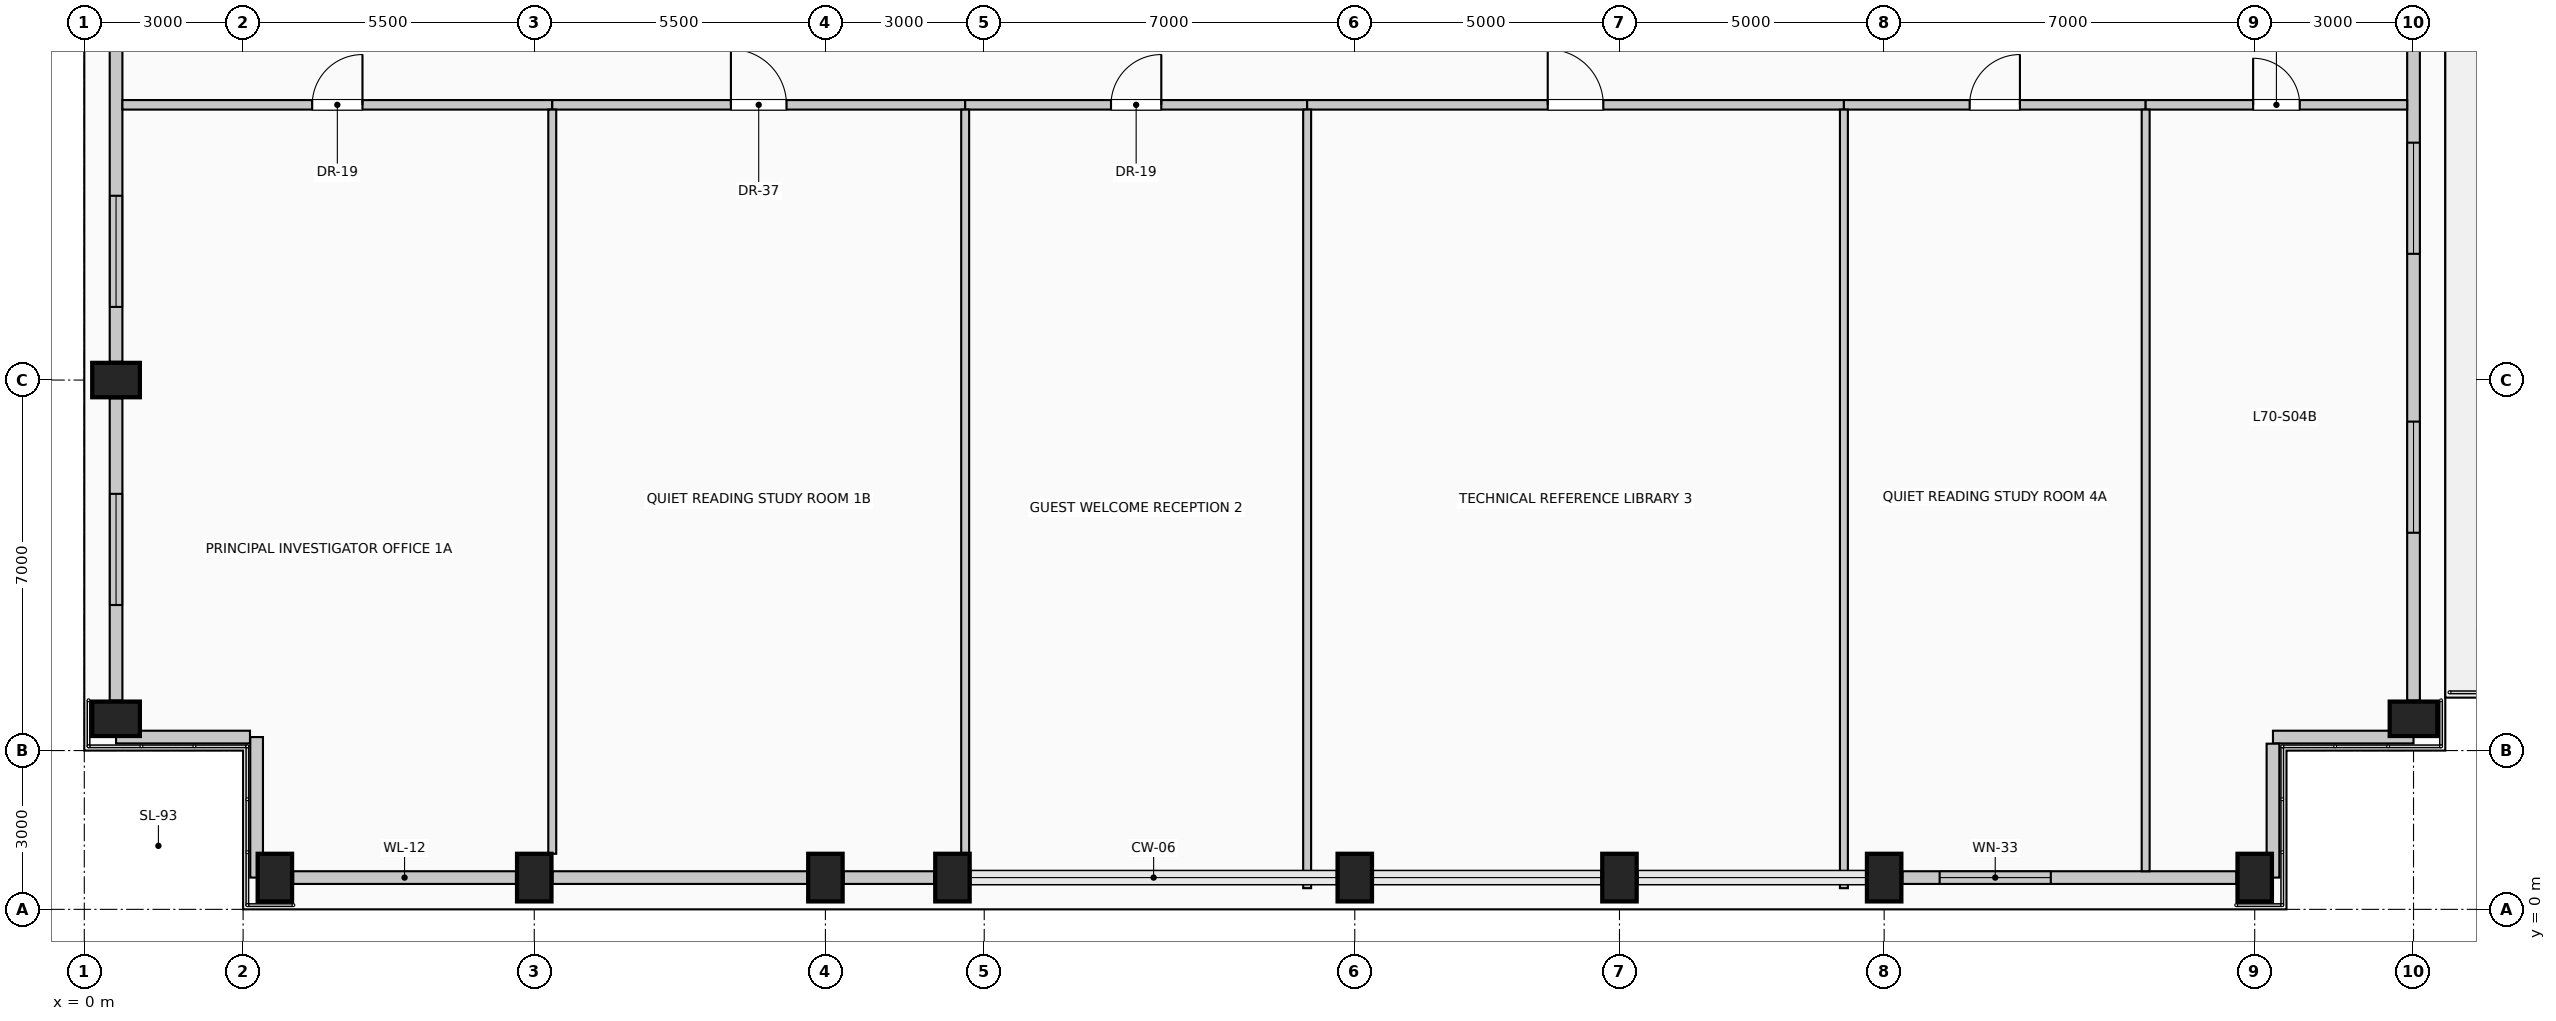
"""IFC4 building model, lengths in metres.
Left out: names, types, materials, properties, quantities, classifications, styles, units other than length and angle.
Written with IfcOpenShell. Run it as: python <this file> out.ifc"""

import sys

from ifc_helpers import new_model, si_unit, direction, frame, frame_2d, origin, origin_2d, place, context, subcontext, project, spatial, rectangle, extrude, element, fill, save


model = new_model("IFC4")
c1 = context("Model", 3, precision=1e-05, world=origin(), true_north=direction((0.0, 1.0)))
c2 = subcontext(c1, "Body", "Model", "MODEL_VIEW")
j1 = project(units=[si_unit("LENGTHUNIT", "METRE"), si_unit("PLANEANGLEUNIT", "RADIAN")], contexts=[c1])
p1 = place(None, origin())
s1 = spatial("IfcSite", under=j1, at=p1, CompositionType="ELEMENT")
p2 = place(p1, origin())
s2 = spatial("IfcBuilding", under=s1, at=p2, CompositionType="ELEMENT")
p3 = place(p2, frame((0.0, 0.0, 289.0)))
s3 = spatial("IfcBuildingStorey", under=s2, at=p3, CompositionType="ELEMENT", Elevation=289.0)
for number, where, z_axis, x_axis in (
    (1, (3.6, 0.6, 0.0), (0.0, 0.0, 1.0), (1.0, 0.0, 0.0)),
    (2, (8.5, 0.6, 0.0), (0.0, 0.0, 1.0), (1.0, 0.0, 0.0)),
    (3, (14.0, 0.6, 0.0), (0.0, 0.0, 1.0), (1.0, 0.0, 0.0)),
    (4, (16.4, 0.6, 0.0), (0.0, 0.0, 1.0), (1.0, 0.0, 0.0)),
    (5, (24.0, 0.6, 0.0), (0.0, 0.0, 1.0), (1.0, 0.0, 0.0)),
    (6, (29.0, 0.6, 0.0), (0.0, 0.0, 1.0), (1.0, 0.0, 0.0)),
    (7, (34.0, 0.6, 0.0), (0.0, 0.0, 1.0), (1.0, 0.0, 0.0)),
    (8, (41.0, 0.6, 0.0), (0.0, 0.0, 1.0), (1.0, 0.0, 0.0)),
    (9, (0.6, 3.6, 0.0), (0.0, 0.0, 1.0), (0.0, 1.0, 0.0)),
    (10, (44.0, 3.6, 0.0), (0.0, 0.0, 1.0), (0.0, 1.0, 0.0)),
    (11, (0.6, 10.0, 0.0), (0.0, 0.0, 1.0), (0.0, 1.0, 0.0)),
):
    element("IfcColumn", number, at=place(p3, frame(where, z_axis=z_axis, x_axis=x_axis)), inside=s3, PredefinedType="COLUMN", context=c2, shape_type="SweptSolid", body=[
        extrude(rectangle(XDim=0.65, YDim=0.9, at=origin_2d()), origin(), (0.0, 0.0, 1.0), 4.0),
    ])
p4 = place(p3, frame((8.155, 0.6, 0.0), z_axis=(0.0, 0.0, 1.0), x_axis=(-1.0, 0.0, 0.0)))
e12 = element("IfcWall", 12, at=p4, inside=s3, PredefinedType="SOLIDWALL", context=c2, shape_type="SweptSolid", body=[
    extrude(rectangle(XDim=4.21, YDim=0.24, at=frame_2d((2.105, 0.0))), origin(), (0.0, 0.0, 1.0), 3.025),
])
p5 = place(p3, frame((13.655, 0.6, 0.0), z_axis=(0.0, 0.0, 1.0), x_axis=(-1.0, 0.0, 0.0)))
e13 = element("IfcWall", 13, at=p5, inside=s3, PredefinedType="SOLIDWALL", context=c2, shape_type="SweptSolid", body=[
    extrude(rectangle(XDim=4.81, YDim=0.24, at=frame_2d((2.405, 0.0))), origin(), (0.0, 0.0, 1.0), 3.025),
])
p6 = place(p3, frame((16.055, 0.6, 0.0), z_axis=(0.0, 0.0, 1.0), x_axis=(-1.0, 0.0, 0.0)))
e14 = element("IfcWall", 14, at=p6, inside=s3, PredefinedType="SOLIDWALL", context=c2, shape_type="SweptSolid", body=[
    extrude(rectangle(XDim=1.71, YDim=0.24, at=frame_2d((0.855, 0.0))), origin(), (0.0, 0.0, 1.0), 3.025),
])
p7 = place(p3, frame((40.655, 0.6, 0.0), z_axis=(0.0, 0.0, 1.0), x_axis=(-1.0, 0.0, 0.0)))
e15 = element("IfcWall", 15, at=p7, inside=s3, PredefinedType="SOLIDWALL", context=c2, shape_type="SweptSolid", body=[
    extrude(rectangle(XDim=6.31, YDim=0.24, at=frame_2d((3.155, 0.0))), origin(), (0.0, 0.0, 1.0), 3.025),
])
p8 = place(p7, frame((3.507, 0.0, 0.35)))
e16 = element("IfcOpeningElement", 16, at=p8, cuts=e15, PredefinedType="OPENING", context=c2, shape_type="SweptSolid", body=[
    extrude(rectangle(XDim=2.1, YDim=2.2, at=frame_2d((1.05, 1.1))), frame((0.0, 0.13, 0.0), z_axis=(0.0, -1.0, 0.0), x_axis=(1.0, 0.0, 0.0)), (0.0, 0.0, 1.0), 0.26),
])
p9 = place(p3, frame((0.6, 3.945, 0.0), z_axis=(0.0, 0.0, 1.0), x_axis=(0.0, 1.0, 0.0)))
e17 = element("IfcWall", 17, at=p9, inside=s3, PredefinedType="SOLIDWALL", context=c2, shape_type="SweptSolid", body=[
    extrude(rectangle(XDim=5.71, YDim=0.24, at=frame_2d((2.855, 0.0))), origin(), (0.0, 0.0, 1.0), 3.025),
])
p10 = place(p9, frame((1.805, 0.0, 0.35)))
e18 = element("IfcOpeningElement", 18, at=p10, cuts=e17, PredefinedType="OPENING", context=c2, shape_type="SweptSolid", body=[
    extrude(rectangle(XDim=2.1, YDim=2.2, at=frame_2d((1.05, 1.1))), frame((0.0, 0.13, 0.0), z_axis=(0.0, -1.0, 0.0), x_axis=(1.0, 0.0, 0.0)), (0.0, 0.0, 1.0), 0.26),
])
p11 = place(p3, frame((0.6, 10.345, 0.0), z_axis=(0.0, 0.0, 1.0), x_axis=(0.0, 1.0, 0.0)))
e19 = element("IfcWall", 19, at=p11, inside=s3, PredefinedType="SOLIDWALL", context=c2, shape_type="SweptSolid", body=[
    extrude(rectangle(XDim=7.31, YDim=0.24, at=frame_2d((3.655, 0.0))), origin(), (0.0, 0.0, 1.0), 3.025),
])
p12 = place(p11, frame((1.037, 0.0, 0.35)))
e20 = element("IfcOpeningElement", 20, at=p12, cuts=e19, PredefinedType="OPENING", context=c2, shape_type="SweptSolid", body=[
    extrude(rectangle(XDim=2.1, YDim=2.2, at=frame_2d((1.05, 1.1))), frame((0.0, 0.13, 0.0), z_axis=(0.0, -1.0, 0.0), x_axis=(1.0, 0.0, 0.0)), (0.0, 0.0, 1.0), 0.26),
])
p13 = place(p3, frame((44.0, 17.655, 0.0), z_axis=(0.0, 0.0, 1.0), x_axis=(0.0, -1.0, 0.0)))
e21 = element("IfcWall", 21, at=p13, inside=s3, PredefinedType="SOLIDWALL", context=c2, shape_type="SweptSolid", body=[
    extrude(rectangle(XDim=13.71, YDim=0.24, at=frame_2d((6.855, 0.0))), origin(), (0.0, 0.0, 1.0), 3.025),
])
p14 = place(p13, frame((3.17, 0.0, 0.35)))
e22 = element("IfcOpeningElement", 22, at=p14, cuts=e21, PredefinedType="OPENING", context=c2, shape_type="SweptSolid", body=[
    extrude(rectangle(XDim=2.1, YDim=2.2, at=frame_2d((1.05, 1.1))), frame((0.0, 0.13, 0.0), z_axis=(0.0, -1.0, 0.0), x_axis=(1.0, 0.0, 0.0)), (0.0, 0.0, 1.0), 0.26),
])
p15 = place(p13, frame((8.44, 0.0, 0.35)))
e23 = element("IfcOpeningElement", 23, at=p15, cuts=e21, PredefinedType="OPENING", context=c2, shape_type="SweptSolid", body=[
    extrude(rectangle(XDim=2.1, YDim=2.2, at=frame_2d((1.05, 1.1))), frame((0.0, 0.13, 0.0), z_axis=(0.0, -1.0, 0.0), x_axis=(1.0, 0.0, 0.0)), (0.0, 0.0, 1.0), 0.26),
])
p16 = place(p3, frame((44.0, 3.255, 0.0), z_axis=(0.0, 0.0, 1.0), x_axis=(-1.0, 0.0, 0.0)))
e24 = element("IfcWall", 24, at=p16, inside=s3, PredefinedType="SOLIDWALL", context=c2, shape_type="SweptSolid", body=[
    extrude(rectangle(XDim=2.655, YDim=0.24, at=frame_2d((1.328, 0.0))), origin(), (0.0, 0.0, 1.0), 3.775),
])
p17 = place(p3, frame((41.345, 3.13, 0.0), z_axis=(0.0, 0.0, 1.0), x_axis=(0.0, -1.0, 0.0)))
e25 = element("IfcWall", 25, at=p17, inside=s3, PredefinedType="SOLIDWALL", context=c2, shape_type="SweptSolid", body=[
    extrude(rectangle(XDim=2.53, YDim=0.24, at=frame_2d((1.265, 0.0))), origin(), (0.0, 0.0, 1.0), 3.775),
])
p18 = place(p3, frame((3.255, 0.6, 0.0), z_axis=(0.0, 0.0, 1.0), x_axis=(0.0, 1.0, 0.0)))
e26 = element("IfcWall", 26, at=p18, inside=s3, PredefinedType="SOLIDWALL", context=c2, shape_type="SweptSolid", body=[
    extrude(rectangle(XDim=2.655, YDim=0.24, at=frame_2d((1.327, 0.0))), origin(), (0.0, 0.0, 1.0), 3.775),
])
p19 = place(p3, frame((3.13, 3.255, 0.0), z_axis=(0.0, 0.0, 1.0), x_axis=(-1.0, 0.0, 0.0)))
e27 = element("IfcWall", 27, at=p19, inside=s3, PredefinedType="SOLIDWALL", context=c2, shape_type="SweptSolid", body=[
    extrude(rectangle(XDim=2.53, YDim=0.24, at=frame_2d((1.265, 0.0))), origin(), (0.0, 0.0, 1.0), 3.775),
])
p20 = place(p3, frame((0.72, 15.2, 0.0), z_axis=(0.0, 0.0, 1.0), x_axis=(1.0, 0.0, 0.0)))
e28 = element("IfcWall", 28, at=p20, inside=s3, PredefinedType="PARTITIONING", context=c2, shape_type="SweptSolid", body=[
    extrude(rectangle(XDim=8.12, YDim=0.18, at=frame_2d((4.06, 0.0))), origin(), (0.0, 0.0, 1.0), 3.775),
])
p21 = place(p20, frame((3.585, 0.0, 0.0)))
e29 = element("IfcOpeningElement", 29, at=p21, cuts=e28, PredefinedType="OPENING", context=c2, shape_type="SweptSolid", body=[
    extrude(rectangle(XDim=0.95, YDim=2.15, at=frame_2d((0.475, 1.075))), frame((0.0, 0.1, 0.0), z_axis=(0.0, -1.0, 0.0), x_axis=(1.0, 0.0, 0.0)), (0.0, 0.0, 1.0), 0.2),
])
p22 = place(p3, frame((8.84, 15.2, 0.0), z_axis=(0.0, 0.0, 1.0), x_axis=(1.0, 0.0, 0.0)))
e30 = element("IfcWall", 30, at=p22, inside=s3, PredefinedType="PARTITIONING", context=c2, shape_type="SweptSolid", body=[
    extrude(rectangle(XDim=7.8, YDim=0.18, at=frame_2d((3.9, 0.0))), origin(), (0.0, 0.0, 1.0), 3.775),
])
p23 = place(p22, frame((3.375, 0.0, 0.0)))
e31 = element("IfcOpeningElement", 31, at=p23, cuts=e30, PredefinedType="OPENING", context=c2, shape_type="SweptSolid", body=[
    extrude(rectangle(XDim=1.05, YDim=2.15, at=frame_2d((0.525, 1.075))), frame((0.0, 0.1, 0.0), z_axis=(0.0, -1.0, 0.0), x_axis=(1.0, 0.0, 0.0)), (0.0, 0.0, 1.0), 0.2),
])
p24 = place(p3, frame((16.64, 15.2, 0.0), z_axis=(0.0, 0.0, 1.0), x_axis=(1.0, 0.0, 0.0)))
e32 = element("IfcWall", 32, at=p24, inside=s3, PredefinedType="PARTITIONING", context=c2, shape_type="SweptSolid", body=[
    extrude(rectangle(XDim=6.46, YDim=0.18, at=frame_2d((3.23, 0.0))), origin(), (0.0, 0.0, 1.0), 3.775),
])
p25 = place(p24, frame((2.755, 0.0, 0.0)))
e33 = element("IfcOpeningElement", 33, at=p25, cuts=e32, PredefinedType="OPENING", context=c2, shape_type="SweptSolid", body=[
    extrude(rectangle(XDim=0.95, YDim=2.15, at=frame_2d((0.475, 1.075))), frame((0.0, 0.1, 0.0), z_axis=(0.0, -1.0, 0.0), x_axis=(1.0, 0.0, 0.0)), (0.0, 0.0, 1.0), 0.2),
])
p26 = place(p3, frame((23.1, 15.2, 0.0), z_axis=(0.0, 0.0, 1.0), x_axis=(1.0, 0.0, 0.0)))
e34 = element("IfcWall", 34, at=p26, inside=s3, PredefinedType="PARTITIONING", context=c2, shape_type="SweptSolid", body=[
    extrude(rectangle(XDim=10.14, YDim=0.18, at=frame_2d((5.07, 0.0))), origin(), (0.0, 0.0, 1.0), 3.775),
])
p27 = place(p26, frame((4.545, 0.0, 0.0)))
e35 = element("IfcOpeningElement", 35, at=p27, cuts=e34, PredefinedType="OPENING", context=c2, shape_type="SweptSolid", body=[
    extrude(rectangle(XDim=1.05, YDim=2.15, at=frame_2d((0.525, 1.075))), frame((0.0, 0.1, 0.0), z_axis=(0.0, -1.0, 0.0), x_axis=(1.0, 0.0, 0.0)), (0.0, 0.0, 1.0), 0.2),
])
p28 = place(p3, frame((33.24, 15.2, 0.0), z_axis=(0.0, 0.0, 1.0), x_axis=(1.0, 0.0, 0.0)))
e36 = element("IfcWall", 36, at=p28, inside=s3, PredefinedType="PARTITIONING", context=c2, shape_type="SweptSolid", body=[
    extrude(rectangle(XDim=5.7, YDim=0.18, at=frame_2d((2.85, 0.0))), origin(), (0.0, 0.0, 1.0), 3.775),
])
p29 = place(p28, frame((2.375, 0.0, 0.0)))
e37 = element("IfcOpeningElement", 37, at=p29, cuts=e36, PredefinedType="OPENING", context=c2, shape_type="SweptSolid", body=[
    extrude(rectangle(XDim=0.95, YDim=2.15, at=frame_2d((0.475, 1.075))), frame((0.0, 0.1, 0.0), z_axis=(0.0, -1.0, 0.0), x_axis=(1.0, 0.0, 0.0)), (0.0, 0.0, 1.0), 0.2),
])
p30 = place(p3, frame((38.94, 15.2, 0.0), z_axis=(0.0, 0.0, 1.0), x_axis=(1.0, 0.0, 0.0)))
e38 = element("IfcWall", 38, at=p30, inside=s3, PredefinedType="PARTITIONING", context=c2, shape_type="SweptSolid", body=[
    extrude(rectangle(XDim=4.94, YDim=0.18, at=frame_2d((2.47, 0.0))), origin(), (0.0, 0.0, 1.0), 3.775),
])
p31 = place(p30, frame((2.03, 0.0, 0.0)))
e39 = element("IfcOpeningElement", 39, at=p31, cuts=e38, PredefinedType="OPENING", context=c2, shape_type="SweptSolid", body=[
    extrude(rectangle(XDim=0.88, YDim=2.1, at=frame_2d((0.44, 1.05))), frame((0.0, 0.1, 0.0), z_axis=(0.0, -1.0, 0.0), x_axis=(1.0, 0.0, 0.0)), (0.0, 0.0, 1.0), 0.2),
])
p32 = place(p3, frame((8.84, 1.05, 0.0), z_axis=(0.0, 0.0, 1.0), x_axis=(0.0, 1.0, 0.0)))
e40 = element("IfcWall", 40, at=p32, inside=s3, PredefinedType="PARTITIONING", context=c2, shape_type="SweptSolid", body=[
    extrude(rectangle(XDim=14.06, YDim=0.15, at=frame_2d((7.03, 0.0))), origin(), (0.0, 0.0, 1.0), 3.775),
])
p33 = place(p3, frame((16.64, 1.05, 0.0), z_axis=(0.0, 0.0, 1.0), x_axis=(0.0, 1.0, 0.0)))
e41 = element("IfcWall", 41, at=p33, inside=s3, PredefinedType="PARTITIONING", context=c2, shape_type="SweptSolid", body=[
    extrude(rectangle(XDim=14.06, YDim=0.15, at=frame_2d((7.03, 0.0))), origin(), (0.0, 0.0, 1.0), 3.27),
])
for number, where, z_axis, x_axis in (
    (42, (23.1, 0.4, 0.0), (0.0, 0.0, 1.0), (0.0, 1.0, 0.0)),
    (43, (33.24, 0.4, 0.0), (0.0, 0.0, 1.0), (0.0, 1.0, 0.0)),
):
    element("IfcWall", number, at=place(p3, frame(where, z_axis=z_axis, x_axis=x_axis)), inside=s3, PredefinedType="PARTITIONING", context=c2, shape_type="SweptSolid", body=[
        extrude(rectangle(XDim=14.71, YDim=0.15, at=frame_2d((7.355, 0.0))), origin(), (0.0, 0.0, 1.0), 3.775),
    ])
p34 = place(p3, frame((38.94, 0.72, 0.0), z_axis=(0.0, 0.0, 1.0), x_axis=(0.0, 1.0, 0.0)))
e44 = element("IfcWall", 44, at=p34, inside=s3, PredefinedType="PARTITIONING", context=c2, shape_type="SweptSolid", body=[
    extrude(rectangle(XDim=14.39, YDim=0.15, at=frame_2d((7.195, 0.0))), origin(), (0.0, 0.0, 1.0), 3.775),
])
p35 = place(p8, origin())
e45 = element("IfcWindow", 45, at=p35, inside=s3, PartitioningType="SINGLE_PANEL", PredefinedType="WINDOW", context=c2, shape_type="SweptSolid", body=[
    extrude(rectangle(XDim=2.1, YDim=2.2, at=frame_2d((1.05, 1.1))), frame((0.0, 0.03, 0.0), z_axis=(0.0, -1.0, 0.0), x_axis=(1.0, 0.0, 0.0)), (0.0, 0.0, 1.0), 0.06),
])
fill(e16, e45)
p36 = place(p10, origin())
e46 = element("IfcWindow", 46, at=p36, inside=s3, PartitioningType="SINGLE_PANEL", PredefinedType="WINDOW", context=c2, shape_type="SweptSolid", body=[
    extrude(rectangle(XDim=2.1, YDim=2.2, at=frame_2d((1.05, 1.1))), frame((0.0, 0.03, 0.0), z_axis=(0.0, -1.0, 0.0), x_axis=(1.0, 0.0, 0.0)), (0.0, 0.0, 1.0), 0.06),
])
fill(e18, e46)
p37 = place(p12, origin())
e47 = element("IfcWindow", 47, at=p37, inside=s3, PartitioningType="SINGLE_PANEL", PredefinedType="WINDOW", context=c2, shape_type="SweptSolid", body=[
    extrude(rectangle(XDim=2.1, YDim=2.2, at=frame_2d((1.05, 1.1))), frame((0.0, 0.03, 0.0), z_axis=(0.0, -1.0, 0.0), x_axis=(1.0, 0.0, 0.0)), (0.0, 0.0, 1.0), 0.06),
])
fill(e20, e47)
p38 = place(p14, origin())
e48 = element("IfcWindow", 48, at=p38, inside=s3, PartitioningType="SINGLE_PANEL", PredefinedType="WINDOW", context=c2, shape_type="SweptSolid", body=[
    extrude(rectangle(XDim=2.1, YDim=2.2, at=frame_2d((1.05, 1.1))), frame((0.0, 0.03, 0.0), z_axis=(0.0, -1.0, 0.0), x_axis=(1.0, 0.0, 0.0)), (0.0, 0.0, 1.0), 0.06),
])
fill(e22, e48)
p39 = place(p15, origin())
e49 = element("IfcWindow", 49, at=p39, inside=s3, PartitioningType="SINGLE_PANEL", PredefinedType="WINDOW", context=c2, shape_type="SweptSolid", body=[
    extrude(rectangle(XDim=2.1, YDim=2.2, at=frame_2d((1.05, 1.1))), frame((0.0, 0.03, 0.0), z_axis=(0.0, -1.0, 0.0), x_axis=(1.0, 0.0, 0.0)), (0.0, 0.0, 1.0), 0.06),
])
fill(e23, e49)
p40 = place(p21, origin())
e50 = element("IfcDoor", 50, at=p40, inside=s3, OperationType="SINGLE_SWING_RIGHT", PredefinedType="DOOR", context=c2, shape_type="SweptSolid", body=[
    extrude(rectangle(XDim=0.95, YDim=2.15, at=frame_2d((0.475, 1.075))), frame((0.0, 0.025, 0.0), z_axis=(0.0, -1.0, 0.0), x_axis=(1.0, 0.0, 0.0)), (0.0, 0.0, 1.0), 0.05),
])
fill(e29, e50)
p41 = place(p23, origin())
e51 = element("IfcDoor", 51, at=p41, inside=s3, OperationType="SINGLE_SWING_LEFT", PredefinedType="DOOR", context=c2, shape_type="SweptSolid", body=[
    extrude(rectangle(XDim=1.05, YDim=2.15, at=frame_2d((0.525, 1.075))), frame((0.0, 0.025, 0.0), z_axis=(0.0, -1.0, 0.0), x_axis=(1.0, 0.0, 0.0)), (0.0, 0.0, 1.0), 0.05),
])
fill(e31, e51)
p42 = place(p25, origin())
e52 = element("IfcDoor", 52, at=p42, inside=s3, OperationType="SINGLE_SWING_RIGHT", PredefinedType="DOOR", context=c2, shape_type="SweptSolid", body=[
    extrude(rectangle(XDim=0.95, YDim=2.15, at=frame_2d((0.475, 1.075))), frame((0.0, 0.025, 0.0), z_axis=(0.0, -1.0, 0.0), x_axis=(1.0, 0.0, 0.0)), (0.0, 0.0, 1.0), 0.05),
])
fill(e33, e52)
p43 = place(p27, origin())
e53 = element("IfcDoor", 53, at=p43, inside=s3, OperationType="SINGLE_SWING_LEFT", PredefinedType="DOOR", context=c2, shape_type="SweptSolid", body=[
    extrude(rectangle(XDim=1.05, YDim=2.15, at=frame_2d((0.525, 1.075))), frame((0.0, 0.025, 0.0), z_axis=(0.0, -1.0, 0.0), x_axis=(1.0, 0.0, 0.0)), (0.0, 0.0, 1.0), 0.05),
])
fill(e35, e53)
p44 = place(p29, origin())
e54 = element("IfcDoor", 54, at=p44, inside=s3, OperationType="SINGLE_SWING_RIGHT", PredefinedType="DOOR", context=c2, shape_type="SweptSolid", body=[
    extrude(rectangle(XDim=0.95, YDim=2.15, at=frame_2d((0.475, 1.075))), frame((0.0, 0.025, 0.0), z_axis=(0.0, -1.0, 0.0), x_axis=(1.0, 0.0, 0.0)), (0.0, 0.0, 1.0), 0.05),
])
fill(e37, e54)
p45 = place(p31, origin())
e55 = element("IfcDoor", 55, at=p45, inside=s3, OperationType="SINGLE_SWING_LEFT", PredefinedType="DOOR", context=c2, shape_type="SweptSolid", body=[
    extrude(rectangle(XDim=0.88, YDim=2.1, at=frame_2d((0.44, 1.05))), frame((0.0, 0.025, 0.0), z_axis=(0.0, -1.0, 0.0), x_axis=(1.0, 0.0, 0.0)), (0.0, 0.0, 1.0), 0.05),
])
fill(e39, e55)
save(model, sys.argv[1])
